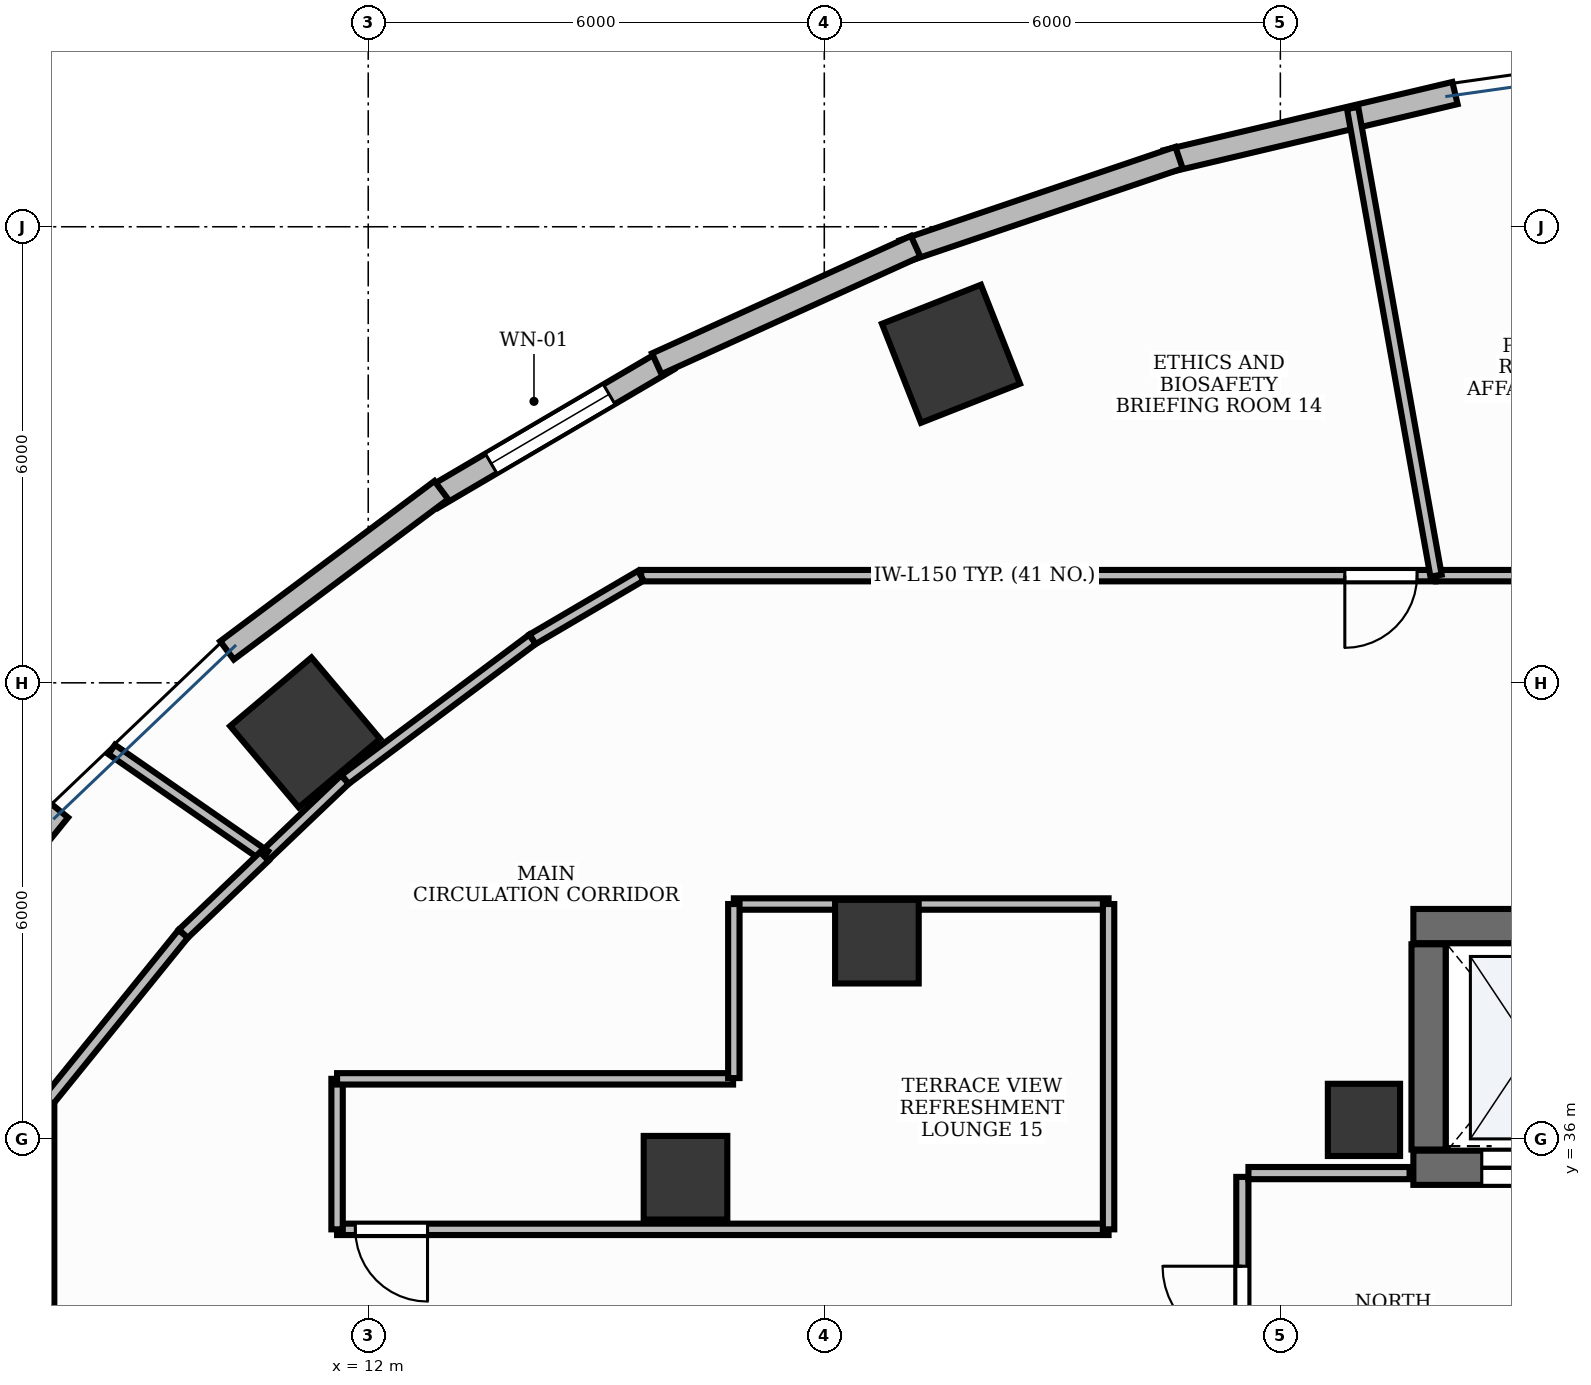
"""IFC4 building model, lengths in metres.
Left out: names, types, materials, properties, quantities, classifications, styles, units other than length and angle.
Written with IfcOpenShell. Run it as: python <this file> out.ifc"""

import sys

from ifc_helpers import new_model, si_unit, direction, frame, frame_2d, origin, origin_2d, place, context, subcontext, project, spatial, rectangle, extrude, element, fill, save


model = new_model("IFC4")
c1 = context("Model", 3, precision=1e-05, world=origin(), true_north=direction((0.0, 1.0)))
c2 = subcontext(c1, "Body", "Model", "MODEL_VIEW")
j1 = project(units=[si_unit("LENGTHUNIT", "METRE"), si_unit("PLANEANGLEUNIT", "RADIAN")], contexts=[c1])
p1 = place(None, origin())
s1 = spatial("IfcSite", under=j1, at=p1, CompositionType="ELEMENT")
p2 = place(p1, origin())
s2 = spatial("IfcBuilding", under=s1, at=p2, CompositionType="ELEMENT")
p3 = place(p2, frame((0.0, 0.0, 25.8)))
s3 = spatial("IfcBuildingStorey", under=s2, at=p3, CompositionType="ELEMENT", Elevation=25.8)
p4 = place(p3, frame((25.75, 38.8, 0.0), z_axis=(0.0, 0.0, 1.0), x_axis=(1.0, 0.0, 0.0)))
e1 = element("IfcWall", 1, at=p4, inside=s3, PredefinedType="SHEAR", context=c2, shape_type="SweptSolid", body=[
    extrude(rectangle(XDim=3.1, YDim=0.45, at=frame_2d((1.55, 0.0))), origin(), (0.0, 0.0, 1.0), 3.9),
])
p5 = place(p3, frame((25.75, 35.62, 0.0), z_axis=(0.0, 0.0, 1.0), x_axis=(1.0, 0.0, 0.0)))
e2 = element("IfcWall", 2, at=p5, inside=s3, PredefinedType="SHEAR", context=c2, shape_type="SweptSolid", body=[
    extrude(rectangle(XDim=3.1, YDim=0.45, at=frame_2d((1.55, 0.0))), origin(), (0.0, 0.0, 1.0), 3.9),
])
p6 = place(p5, frame((0.9, 0.0, 0.0)))
e3 = element("IfcOpeningElement", 3, at=p6, cuts=e2, PredefinedType="OPENING", context=c2, shape_type="SweptSolid", body=[
    extrude(rectangle(XDim=1.3, YDim=2.2, at=frame_2d((0.65, 1.1))), frame((0.0, 0.24, 0.0), z_axis=(0.0, -1.0, 0.0), x_axis=(1.0, 0.0, 0.0)), (0.0, 0.0, 1.0), 0.48),
])
p7 = place(p3, frame((25.95, 35.86, 0.0), z_axis=(0.0, 0.0, 1.0), x_axis=(0.0, 1.0, 0.0)))
e4 = element("IfcWall", 4, at=p7, inside=s3, PredefinedType="SHEAR", context=c2, shape_type="SweptSolid", body=[
    extrude(rectangle(XDim=2.7, YDim=0.45, at=frame_2d((1.35, 0.0))), origin(), (0.0, 0.0, 1.0), 3.9),
])
p8 = place(p3, frame((25.1, 36.25, -0.0), z_axis=(0.0, 0.0, 1.0), x_axis=(1.0, 0.0, 0.0)))
e5 = element("IfcColumn", 5, at=p8, inside=s3, PredefinedType="PILASTER", context=c2, shape_type="SweptSolid", body=[
    extrude(rectangle(XDim=0.95, YDim=0.95, at=origin_2d()), origin(), (0.0, 0.0, 1.0), 3.901),
])
for number, where, z_axis, x_axis in (
    (6, (19.667, 46.329, -0.0), (0.0, 0.0, 1.0), (0.93, 0.367, 0.0)),
    (7, (11.17, 41.347, -0.0), (0.0, 0.0, 1.0), (0.764, 0.645, 0.0)),
):
    element("IfcColumn", number, at=place(p3, frame(where, z_axis=z_axis, x_axis=x_axis)), inside=s3, PredefinedType="COLUMN", context=c2, shape_type="SweptSolid", body=[
        extrude(rectangle(XDim=1.4, YDim=1.4, at=origin_2d()), origin(), (0.0, 0.0, 1.0), 3.901),
    ])
for number, where, z_axis, x_axis in (
    (8, (18.692, 38.595, -0.0), (0.0, 0.0, 1.0), (1.0, 0.0, 0.0)),
    (9, (16.174, 35.489, -0.0), (0.0, 0.0, 1.0), (1.0, 0.0, 0.0)),
):
    element("IfcColumn", number, at=place(p3, frame(where, z_axis=z_axis, x_axis=x_axis)), inside=s3, PredefinedType="COLUMN", context=c2, shape_type="SweptSolid", body=[
        extrude(rectangle(XDim=1.1, YDim=1.1, at=origin_2d()), origin(), (0.0, 0.0, 1.0), 3.901),
    ])
p9 = place(p3, frame((15.944, 46.25, 0.0), z_axis=(0.0, 0.0, 1.0), x_axis=(-0.862473134325, -0.506102847817, 0.0)))
e10 = element("IfcWall", 10, at=p9, inside=s3, PredefinedType="STANDARD", context=c2, shape_type="SweptSolid", body=[
    extrude(rectangle(XDim=3.595, YDim=0.3, at=frame_2d((1.798, 0.0))), origin(), (0.0, 0.0, 1.0), 3.9),
])
p10 = place(p9, frame((0.898, 0.0, 0.9)))
e11 = element("IfcOpeningElement", 11, at=p10, cuts=e10, PredefinedType="OPENING", context=c2, shape_type="SweptSolid", body=[
    extrude(rectangle(XDim=1.8, YDim=2.1, at=frame_2d((0.9, 1.05))), frame((0.0, 0.165, 0.0), z_axis=(0.0, -1.0, 0.0), x_axis=(1.0, 0.0, 0.0)), (0.0, 0.0, 1.0), 0.33),
])
p11 = place(p3, frame((26.297, 49.759, 0.0), z_axis=(0.0, 0.0, 1.0), x_axis=(-0.973197600754, -0.229970497863, 0.0)))
e12 = element("IfcWall", 12, at=p11, inside=s3, PredefinedType="STANDARD", context=c2, shape_type="SweptSolid", body=[
    extrude(rectangle(XDim=3.901, YDim=0.3, at=frame_2d((1.951, 0.0))), origin(), (0.0, 0.0, 1.0), 3.9),
])
p12 = place(p3, frame((22.667, 48.909, 0.0), z_axis=(0.0, 0.0, 1.0), x_axis=(-0.94702579403, -0.321157508773, 0.0)))
e13 = element("IfcWall", 13, at=p12, inside=s3, PredefinedType="STANDARD", context=c2, shape_type="SweptSolid", body=[
    extrude(rectangle(XDim=3.83, YDim=0.3, at=frame_2d((1.915, 0.0))), origin(), (0.0, 0.0, 1.0), 3.9),
])
p13 = place(p3, frame((19.201, 47.743, 0.0), z_axis=(0.0, 0.0, 1.0), x_axis=(-0.910623406862, -0.413237233166, 0.0)))
e14 = element("IfcWall", 14, at=p13, inside=s3, PredefinedType="STANDARD", context=c2, shape_type="SweptSolid", body=[
    extrude(rectangle(XDim=3.74, YDim=0.3, at=frame_2d((1.87, 0.0))), origin(), (0.0, 0.0, 1.0), 3.9),
])
p14 = place(p3, frame((12.961, 44.535, 0.0), z_axis=(0.0, 0.0, 1.0), x_axis=(-0.800823020995, -0.598901067827, 0.0)))
e15 = element("IfcWall", 15, at=p14, inside=s3, PredefinedType="STANDARD", context=c2, shape_type="SweptSolid", body=[
    extrude(rectangle(XDim=3.521, YDim=0.3, at=frame_2d((1.76, 0.0))), origin(), (0.0, 0.0, 1.0), 3.9),
])
p15 = place(p3, frame((7.934, 40.323, 0.0), z_axis=(0.0, 0.0, 1.0), x_axis=(-0.629221727718, -0.777225847079, 0.0)))
e16 = element("IfcWall", 16, at=p15, inside=s3, PredefinedType="STANDARD", context=c2, shape_type="SweptSolid", body=[
    extrude(rectangle(XDim=3.288, YDim=0.3, at=frame_2d((1.644, 0.0))), origin(), (0.0, 0.0, 1.0), 3.47),
])
p16 = place(p3, frame((23.5, 32.1, 0.0), z_axis=(0.0, 0.0, 1.0), x_axis=(0.0, 1.0, 0.0)))
e17 = element("IfcWall", 17, at=p16, inside=s3, PredefinedType="PARTITIONING", context=c2, shape_type="SweptSolid", body=[
    extrude(rectangle(XDim=3.4, YDim=0.16, at=frame_2d((1.7, 0.0))), origin(), (0.0, 0.0, 1.0), 2.91),
])
p17 = place(p16, frame((1.175, 0.0, 0.0)))
e18 = element("IfcOpeningElement", 18, at=p17, cuts=e17, PredefinedType="OPENING", context=c2, shape_type="SweptSolid", body=[
    extrude(rectangle(XDim=1.05, YDim=2.15, at=frame_2d((0.525, 1.075))), frame((0.0, 0.095, 0.0), z_axis=(0.0, -1.0, 0.0), x_axis=(1.0, 0.0, 0.0)), (0.0, 0.0, 1.0), 0.19),
])
p18 = place(p3, frame((23.58, 35.55, 0.0), z_axis=(0.0, 0.0, 1.0), x_axis=(1.0, 0.0, 0.0)))
e19 = element("IfcWall", 19, at=p18, inside=s3, PredefinedType="PARTITIONING", context=c2, shape_type="SweptSolid", body=[
    extrude(rectangle(XDim=2.12, YDim=0.16, at=frame_2d((1.06, 0.0))), origin(), (0.0, 0.0, 1.0), 2.91),
])
p19 = place(p3, frame((29.826, 43.41, 0.0), z_axis=(0.0, 0.0, 1.0), x_axis=(-1.0, 0.0, 0.0)))
e20 = element("IfcWall", 20, at=p19, inside=s3, PredefinedType="PARTITIONING", context=c2, shape_type="SweptSolid", body=[
    extrude(rectangle(XDim=3.777, YDim=0.15, at=frame_2d((1.889, 0.0))), origin(), (0.0, 0.0, 1.0), 2.91),
])
p20 = place(p19, frame((0.24, 0.0, 0.0)))
e21 = element("IfcOpeningElement", 21, at=p20, cuts=e20, PredefinedType="OPENING", context=c2, shape_type="SweptSolid", body=[
    extrude(rectangle(XDim=0.95, YDim=2.15, at=frame_2d((0.475, 1.075))), frame((0.0, 0.09, 0.0), z_axis=(0.0, -1.0, 0.0), x_axis=(1.0, 0.0, 0.0)), (0.0, 0.0, 1.0), 0.18),
])
p21 = place(p3, frame((26.038, 43.41, 0.0), z_axis=(0.0, 0.0, 1.0), x_axis=(-1.0, 0.0, 0.0)))
e22 = element("IfcWall", 22, at=p21, inside=s3, PredefinedType="PARTITIONING", context=c2, shape_type="SweptSolid", body=[
    extrude(rectangle(XDim=10.447, YDim=0.15, at=frame_2d((5.224, 0.0))), origin(), (0.0, 0.0, 1.0), 2.91),
])
p22 = place(p21, frame((0.24, 0.0, 0.0)))
e23 = element("IfcOpeningElement", 23, at=p22, cuts=e22, PredefinedType="OPENING", context=c2, shape_type="SweptSolid", body=[
    extrude(rectangle(XDim=0.95, YDim=2.15, at=frame_2d((0.475, 1.075))), frame((0.0, 0.09, 0.0), z_axis=(0.0, -1.0, 0.0), x_axis=(1.0, 0.0, 0.0)), (0.0, 0.0, 1.0), 0.18),
])
p23 = place(p3, frame((21.74, 34.81, 0.0), z_axis=(0.0, 0.0, 1.0), x_axis=(-1.0, 0.0, 0.0)))
e24 = element("IfcWall", 24, at=p23, inside=s3, PredefinedType="PARTITIONING", context=c2, shape_type="SweptSolid", body=[
    extrude(rectangle(XDim=10.15, YDim=0.15, at=frame_2d((5.075, 0.0))), origin(), (0.0, 0.0, 1.0), 2.91),
])
p24 = place(p23, frame((8.96, 0.0, 0.0)))
e25 = element("IfcOpeningElement", 25, at=p24, cuts=e24, PredefinedType="OPENING", context=c2, shape_type="SweptSolid", body=[
    extrude(rectangle(XDim=0.95, YDim=2.15, at=frame_2d((0.475, 1.075))), frame((0.0, 0.09, 0.0), z_axis=(0.0, -1.0, 0.0), x_axis=(1.0, 0.0, 0.0)), (0.0, 0.0, 1.0), 0.18),
])
p25 = place(p3, frame((7.79, 36.501, 0.0), z_axis=(0.0, 0.0, 1.0), x_axis=(0.0, -1.0, 0.0)))
e26 = element("IfcWall", 26, at=p25, inside=s3, PredefinedType="PARTITIONING", context=c2, shape_type="SweptSolid", body=[
    extrude(rectangle(XDim=8.478, YDim=0.16, at=frame_2d((4.239, 0.0))), origin(), (0.0, 0.0, 1.0), 2.91),
])
p26 = place(p25, frame((4.95, 0.0, 0.0)))
e27 = element("IfcOpeningElement", 27, at=p26, cuts=e26, PredefinedType="OPENING", context=c2, shape_type="SweptSolid", body=[
    extrude(rectangle(XDim=0.95, YDim=2.15, at=frame_2d((0.475, 1.075))), frame((0.0, 0.095, 0.0), z_axis=(0.0, -1.0, 0.0), x_axis=(1.0, 0.0, 0.0)), (0.0, 0.0, 1.0), 0.19),
])
p27 = place(p3, frame((26.048, 43.41, 0.0), z_axis=(0.0, 0.0, 1.0), x_axis=(-0.175605435055, 0.984460629573, 0.0)))
e28 = element("IfcWall", 28, at=p27, inside=s3, PredefinedType="PARTITIONING", context=c2, shape_type="SweptSolid", body=[
    extrude(rectangle(XDim=6.251, YDim=0.15, at=frame_2d((3.125, 0.0))), origin(), (0.0, 0.0, 1.0), 2.91),
])
p28 = place(p3, frame((15.586, 43.409, 0.0), z_axis=(0.0, 0.0, 1.0), x_axis=(-0.862446636904, -0.506148000582, 0.0)))
e29 = element("IfcWall", 29, at=p28, inside=s3, PredefinedType="PARTITIONING", context=c2, shape_type="SweptSolid", body=[
    extrude(rectangle(XDim=1.652, YDim=0.15, at=frame_2d((0.826, 0.0))), origin(), (0.0, 0.0, 1.0), 2.91),
])
p29 = place(p3, frame((14.16, 42.572, 0.0), z_axis=(0.0, 0.0, 1.0), x_axis=(-0.800808090092, -0.598921032227, 0.0)))
e30 = element("IfcWall", 30, at=p29, inside=s3, PredefinedType="PARTITIONING", context=c2, shape_type="SweptSolid", body=[
    extrude(rectangle(XDim=3.079, YDim=0.15, at=frame_2d((1.54, 0.0))), origin(), (0.0, 0.0, 1.0), 2.91),
])
p30 = place(p3, frame((11.693, 40.727, 0.0), z_axis=(0.0, 0.0, 1.0), x_axis=(-0.723614682185, -0.690204166697, 0.0)))
e31 = element("IfcWall", 31, at=p30, inside=s3, PredefinedType="PARTITIONING", context=c2, shape_type="SweptSolid", body=[
    extrude(rectangle(XDim=1.454, YDim=0.15, at=frame_2d((0.727, 0.0))), origin(), (0.0, 0.0, 1.0), 2.91),
])
p31 = place(p3, frame((10.641, 39.723, 0.0), z_axis=(0.0, 0.0, 1.0), x_axis=(-0.821561492386, 0.570119912149, 0.0)))
e32 = element("IfcWall", 32, at=p31, inside=s3, PredefinedType="PARTITIONING", context=c2, shape_type="SweptSolid", body=[
    extrude(rectangle(XDim=2.455, YDim=0.15, at=frame_2d((1.227, 0.0))), origin(), (0.0, 0.0, 1.0), 2.91),
])
p32 = place(p3, frame((16.81, 39.09, 0.0), z_axis=(0.0, 0.0, 1.0), x_axis=(1.0, 0.0, 0.0)))
e33 = element("IfcWall", 33, at=p32, inside=s3, PredefinedType="PARTITIONING", context=c2, shape_type="SweptSolid", body=[
    extrude(rectangle(XDim=4.93, YDim=0.15, at=frame_2d((2.465, 0.0))), origin(), (0.0, 0.0, 1.0), 2.91),
])
p33 = place(p3, frame((21.74, 39.09, 0.0), z_axis=(0.0, 0.0, 1.0), x_axis=(0.0, -1.0, 0.0)))
e34 = element("IfcWall", 34, at=p33, inside=s3, PredefinedType="PARTITIONING", context=c2, shape_type="SweptSolid", body=[
    extrude(rectangle(XDim=4.28, YDim=0.15, at=frame_2d((2.14, 0.0))), origin(), (0.0, 0.0, 1.0), 2.91),
])
p34 = place(p3, frame((11.59, 34.81, 0.0), z_axis=(0.0, 0.0, 1.0), x_axis=(0.0, 1.0, 0.0)))
e35 = element("IfcWall", 35, at=p34, inside=s3, PredefinedType="PARTITIONING", context=c2, shape_type="SweptSolid", body=[
    extrude(rectangle(XDim=1.98, YDim=0.15, at=frame_2d((0.99, 0.0))), origin(), (0.0, 0.0, 1.0), 2.91),
])
p35 = place(p3, frame((11.59, 36.79, 0.0), z_axis=(0.0, 0.0, 1.0), x_axis=(1.0, 0.0, 0.0)))
e36 = element("IfcWall", 36, at=p35, inside=s3, PredefinedType="PARTITIONING", context=c2, shape_type="SweptSolid", body=[
    extrude(rectangle(XDim=5.21, YDim=0.15, at=frame_2d((2.605, 0.0))), origin(), (0.0, 0.0, 1.0), 2.91),
])
p36 = place(p3, frame((16.81, 36.8, 0.0), z_axis=(0.0, 0.0, 1.0), x_axis=(0.0, 1.0, 0.0)))
e37 = element("IfcWall", 37, at=p36, inside=s3, PredefinedType="PARTITIONING", context=c2, shape_type="SweptSolid", body=[
    extrude(rectangle(XDim=2.29, YDim=0.15, at=frame_2d((1.145, 0.0))), origin(), (0.0, 0.0, 1.0), 2.91),
])
p37 = place(p3, frame((10.634, 39.717, 0.0), z_axis=(0.0, 0.0, 1.0), x_axis=(-0.723701031319, -0.690113626345, 0.0)))
e38 = element("IfcWall", 38, at=p37, inside=s3, PredefinedType="PARTITIONING", context=c2, shape_type="SweptSolid", body=[
    extrude(rectangle(XDim=1.476, YDim=0.16, at=frame_2d((0.738, 0.0))), origin(), (0.0, 0.0, 1.0), 2.91),
])
p38 = place(p3, frame((9.565, 38.697, 0.0), z_axis=(0.0, 0.0, 1.0), x_axis=(-0.629270515505, -0.777186347227, 0.0)))
e39 = element("IfcWall", 39, at=p38, inside=s3, PredefinedType="PARTITIONING", context=c2, shape_type="SweptSolid", body=[
    extrude(rectangle(XDim=2.817, YDim=0.16, at=frame_2d((1.409, 0.0))), origin(), (0.0, 0.0, 1.0), 2.91),
])
p39 = place(p10, origin())
e40 = element("IfcWindow", 40, at=p39, inside=s3, PartitioningType="SINGLE_PANEL", PredefinedType="WINDOW", context=c2, shape_type="SweptSolid", body=[
    extrude(rectangle(XDim=1.8, YDim=2.1, at=frame_2d((0.9, 1.05))), frame((0.0, 0.03, 0.0), z_axis=(0.0, -1.0, 0.0), x_axis=(1.0, 0.0, 0.0)), (0.0, 0.0, 1.0), 0.06),
])
fill(e11, e40)
p40 = place(p6, origin())
e41 = element("IfcDoor", 41, at=p40, inside=s3, OperationType="DOUBLE_DOOR_SLIDING", PredefinedType="DOOR", context=c2, shape_type="SweptSolid", body=[
    extrude(rectangle(XDim=1.3, YDim=2.2, at=frame_2d((0.65, 1.1))), frame((0.0, 0.025, 0.0), z_axis=(0.0, -1.0, 0.0), x_axis=(1.0, 0.0, 0.0)), (0.0, 0.0, 1.0), 0.05),
])
fill(e3, e41)
p41 = place(p17, origin())
e42 = element("IfcDoor", 42, at=p41, inside=s3, OperationType="SINGLE_SWING_RIGHT", PredefinedType="DOOR", context=c2, shape_type="SweptSolid", body=[
    extrude(rectangle(XDim=1.05, YDim=2.15, at=frame_2d((0.525, 1.075))), frame((0.0, 0.025, 0.0), z_axis=(0.0, -1.0, 0.0), x_axis=(1.0, 0.0, 0.0)), (0.0, 0.0, 1.0), 0.05),
])
fill(e18, e42)
p42 = place(p22, origin())
e43 = element("IfcDoor", 43, at=p42, inside=s3, OperationType="SINGLE_SWING_RIGHT", PredefinedType="DOOR", context=c2, shape_type="SweptSolid", body=[
    extrude(rectangle(XDim=0.95, YDim=2.15, at=frame_2d((0.475, 1.075))), frame((0.0, 0.025, 0.0), z_axis=(0.0, -1.0, 0.0), x_axis=(1.0, 0.0, 0.0)), (0.0, 0.0, 1.0), 0.05),
])
fill(e23, e43)
p43 = place(p24, origin())
e44 = element("IfcDoor", 44, at=p43, inside=s3, OperationType="SINGLE_SWING_LEFT", PredefinedType="DOOR", context=c2, shape_type="SweptSolid", body=[
    extrude(rectangle(XDim=0.95, YDim=2.15, at=frame_2d((0.475, 1.075))), frame((0.0, 0.025, 0.0), z_axis=(0.0, -1.0, 0.0), x_axis=(1.0, 0.0, 0.0)), (0.0, 0.0, 1.0), 0.05),
])
fill(e25, e44)
save(model, sys.argv[1])
